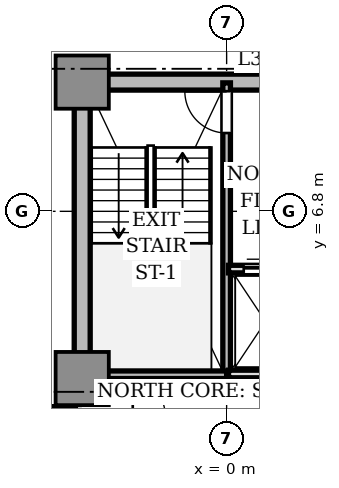
"""IFC4 building model, lengths in metres.
Left out: names, types, materials, properties, quantities, classifications, styles, units other than length and angle.
Written with IfcOpenShell. Run it as: python <this file> out.ifc"""

import sys

from ifc_helpers import new_model, si_unit, direction, frame, frame_2d, origin, origin_2d, place, context, subcontext, project, spatial, rectangle, extrude, source, transform, mapped, element, fill, save


model = new_model("IFC4")
c1 = context("Model", 3, precision=1e-05, world=origin(), true_north=direction((0.0, 1.0)))
c2 = subcontext(c1, "Body", "Model", "MODEL_VIEW")
j1 = project(units=[si_unit("LENGTHUNIT", "METRE"), si_unit("PLANEANGLEUNIT", "RADIAN")], contexts=[c1])
p1 = place(None, origin())
s1 = spatial("IfcSite", under=j1, at=p1, CompositionType="ELEMENT")
p2 = place(p1, origin())
s2 = spatial("IfcBuilding", under=s1, at=p2, CompositionType="ELEMENT")
p3 = place(p2, frame((0.0, 0.0, 131.55)))
s3 = spatial("IfcBuildingStorey", under=s2, at=p3, CompositionType="ELEMENT", Elevation=131.55)
p4 = place(p3, frame((-3.55, 10.2, 0.0), z_axis=(0.0, 0.0, 1.0), x_axis=(1.0, 0.0, 0.0)))
e1 = element("IfcWall", 1, at=p4, inside=s3, PredefinedType="SHEAR", context=c2, shape_type="SweptSolid", body=[
    extrude(rectangle(XDim=7.1, YDim=0.42, at=frame_2d((3.55, 0.0))), origin(), (0.0, 0.0, 1.0), 3.11),
])
p5 = place(p3, frame((-3.8, 2.85, 0.0), z_axis=(0.0, 0.0, 1.0), x_axis=(0.0, 1.0, 0.0)))
e2 = element("IfcWall", 2, at=p5, inside=s3, PredefinedType="SHEAR", context=c2, shape_type="SweptSolid", body=[
    extrude(rectangle(XDim=6.9, YDim=0.42, at=frame_2d((3.45, 0.0))), origin(), (0.0, 0.0, 1.0), 3.11),
])
m1 = source(origin(), c2, "Body", "SweptSolid", [
    extrude(rectangle(XDim=1.4, YDim=1.4, at=origin_2d()), origin(), (0.0, 0.0, 1.0), 3.11),
])
for number, where, z_axis, x_axis in (
    (3, (-3.8, 2.4, 0.0), (0.0, 0.0, 1.0), (1.0, 0.0, 0.0)),
    (4, (-3.8, 10.2, 0.0), (0.0, 0.0, 1.0), (1.0, 0.0, 0.0)),
):
    element("IfcColumn", number, at=place(p3, frame(where, z_axis=z_axis, x_axis=x_axis)), inside=s3, PredefinedType="COLUMN", context=c2, shape_type="MappedRepresentation", body=[
        mapped(m1, transform((0.0, 0.0, 0.0), scale=1.0)),
    ])
p6 = place(p3, frame((0.0, 2.5, 0.0), z_axis=(0.0, 0.0, 1.0), x_axis=(0.0, 1.0, 0.0)))
e5 = element("IfcWall", 5, at=p6, inside=s3, PredefinedType="SOLIDWALL", context=c2, shape_type="SweptSolid", body=[
    extrude(rectangle(XDim=7.68, YDim=0.2, at=frame_2d((3.84, 0.0))), origin(), (0.0, 0.0, 1.0), 3.11),
])
p7 = place(p6, frame((6.36, 0.0, 0.0)))
e6 = element("IfcOpeningElement", 6, at=p7, cuts=e5, PredefinedType="OPENING", context=c2, shape_type="SweptSolid", body=[
    extrude(rectangle(XDim=1.1, YDim=2.15, at=frame_2d((0.55, 1.075))), frame((0.0, 0.11, 0.0), z_axis=(0.0, -1.0, 0.0), x_axis=(1.0, 0.0, 0.0)), (0.0, 0.0, 1.0), 0.22),
])
p8 = place(p3, frame((-3.72, 2.5, 0.0), z_axis=(0.0, 0.0, 1.0), x_axis=(1.0, 0.0, 0.0)))
e7 = element("IfcWall", 7, at=p8, inside=s3, PredefinedType="SOLIDWALL", context=c2, shape_type="SweptSolid", body=[
    extrude(rectangle(XDim=3.72, YDim=0.2, at=frame_2d((1.86, 0.0))), origin(), (0.0, 0.0, 1.0), 3.11),
])
p9 = place(p3, frame((0.05, 2.52, 0.0), z_axis=(0.0, 0.0, 1.0), x_axis=(1.0, 0.0, 0.0)))
e8 = element("IfcWall", 8, at=p9, inside=s3, PredefinedType="SOLIDWALL", context=c2, shape_type="SweptSolid", body=[
    extrude(rectangle(XDim=1.95, YDim=0.2, at=frame_2d((0.975, 0.0))), origin(), (0.0, 0.0, 1.0), 2.66),
])
p10 = place(p3, frame((0.05, 5.28, 0.0), z_axis=(0.0, 0.0, 1.0), x_axis=(1.0, 0.0, 0.0)))
e9 = element("IfcWall", 9, at=p10, inside=s3, PredefinedType="SOLIDWALL", context=c2, shape_type="SweptSolid", body=[
    extrude(rectangle(XDim=1.93, YDim=0.2, at=frame_2d((0.965, 0.0))), origin(), (0.0, 0.0, 1.0), 2.66),
])
p11 = place(p10, frame((0.4, 0.0, 0.0)))
e10 = element("IfcOpeningElement", 10, at=p11, cuts=e9, PredefinedType="OPENING", context=c2, shape_type="SweptSolid", body=[
    extrude(rectangle(XDim=1.1, YDim=2.2, at=frame_2d((0.55, 1.1))), frame((0.0, 0.11, 0.0), z_axis=(0.0, -1.0, 0.0), x_axis=(1.0, 0.0, 0.0)), (0.0, 0.0, 1.0), 0.22),
])
p12 = place(p3, frame((-5.62, 1.56, 0.0), z_axis=(0.0, 0.0, 1.0), x_axis=(1.0, 0.0, 0.0)))
e11 = element("IfcWall", 11, at=p12, inside=s3, PredefinedType="SOLIDWALL", context=c2, shape_type="SweptSolid", body=[
    extrude(rectangle(XDim=1.64, YDim=0.2, at=frame_2d((0.82, 0.0))), origin(), (0.0, 0.0, 1.0), 2.66),
])
p13 = place(p3, frame((-3.542, 11.206, 0.0), z_axis=(0.0, 0.0, 1.0), x_axis=(-0.999046129111, -0.04366728647, 0.0)))
e12 = element("IfcWall", 12, at=p13, inside=s3, PredefinedType="PARTITIONING", context=c2, shape_type="SweptSolid", body=[
    extrude(rectangle(XDim=3.5, YDim=0.18, at=frame_2d((1.75, 0.0))), origin(), (0.0, 0.0, 1.0), 2.66),
])
m2 = source(origin(), c2, "Body", "SweptSolid", [
    extrude(rectangle(XDim=1.1, YDim=0.05, at=origin_2d()), origin(), (0.0, 0.0, 1.0), 2.15),
])
p14 = place(p7, frame((0.55, 0.0, 0.0)))
e13 = element("IfcDoor", 13, at=p14, inside=s3, OperationType="SINGLE_SWING_RIGHT", PredefinedType="DOOR", context=c2, shape_type="MappedRepresentation", body=[
    mapped(m2, transform((0.0, 0.0, 0.0), scale=1.0)),
])
fill(e6, e13)
m3 = source(origin(), c2, "Body", "SweptSolid", [
    extrude(rectangle(XDim=1.1, YDim=0.05, at=origin_2d()), origin(), (0.0, 0.0, 1.0), 2.2),
])
p15 = place(p11, frame((0.55, 0.0, 0.0)))
e14 = element("IfcDoor", 14, at=p15, inside=s3, OperationType="DOUBLE_DOOR_SLIDING", PredefinedType="DOOR", context=c2, shape_type="MappedRepresentation", body=[
    mapped(m3, transform((0.0, 0.0, 0.0), scale=1.0)),
])
fill(e10, e14)
save(model, sys.argv[1])
